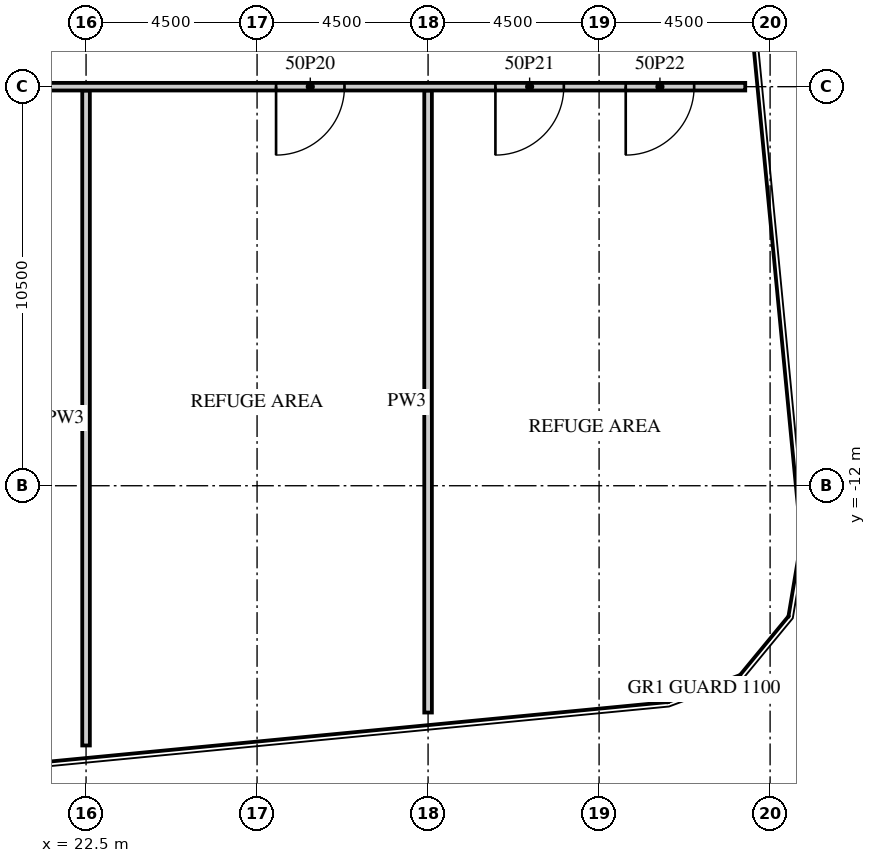
"""IFC4 building model, lengths in metres.
Left out: names, types, materials, properties, quantities, classifications, styles, units other than length and angle.
Written with IfcOpenShell. Run it as: python <this file> out.ifc"""

import sys

from ifc_helpers import new_model, si_unit, direction, frame, frame_2d, origin, place, context, subcontext, project, spatial, rectangle, extrude, element, fill, save


model = new_model("IFC4")
c1 = context("Model", 3, precision=1e-05, world=origin(), true_north=direction((0.0, 1.0)))
c2 = subcontext(c1, "Body", "Model", "MODEL_VIEW")
j1 = project(units=[si_unit("LENGTHUNIT", "METRE"), si_unit("PLANEANGLEUNIT", "RADIAN")], contexts=[c1])
p1 = place(None, origin())
s1 = spatial("IfcSite", under=j1, at=p1, CompositionType="ELEMENT")
p2 = place(p1, origin())
s2 = spatial("IfcBuilding", under=s1, at=p2, CompositionType="ELEMENT")
p3 = place(p2, frame((0.0, 0.0, 206.5)))
s3 = spatial("IfcBuildingStorey", under=s2, at=p3, CompositionType="ELEMENT", Elevation=206.5)
p4 = place(p3, frame((22.5, -18.834, 0.0), z_axis=(0.0, 0.0, 1.0), x_axis=(0.0, 1.0, 0.0)))
e1 = element("IfcWall", 1, at=p4, inside=s3, PredefinedType="PARTITIONING", context=c2, shape_type="SweptSolid", body=[
    extrude(rectangle(XDim=17.234, YDim=0.2, at=frame_2d((8.617, 0.0))), origin(), (0.0, 0.0, 1.0), 4.2),
])
p5 = place(p3, frame((31.5, -17.968, 0.0), z_axis=(0.0, 0.0, 1.0), x_axis=(0.0, 1.0, 0.0)))
e2 = element("IfcWall", 2, at=p5, inside=s3, PredefinedType="PARTITIONING", context=c2, shape_type="SweptSolid", body=[
    extrude(rectangle(XDim=16.367, YDim=0.2, at=frame_2d((8.184, 0.0))), origin(), (0.0, 0.0, 1.0), 4.2),
])
p6 = place(p3, frame((-13.3, -1.5, 0.0), z_axis=(0.0, 0.0, 1.0), x_axis=(1.0, 0.0, 0.0)))
e3 = element("IfcWall", 3, at=p6, inside=s3, PredefinedType="PARTITIONING", context=c2, shape_type="SweptSolid", body=[
    extrude(rectangle(XDim=53.146, YDim=0.2, at=frame_2d((26.573, 0.0))), origin(), (0.0, 0.0, 1.0), 4.2),
])
p7 = place(p6, frame((0.25, 0.0, 0.0)))
e4 = element("IfcOpeningElement", 4, at=p7, cuts=e3, PredefinedType="OPENING", context=c2, shape_type="SweptSolid", body=[
    extrude(rectangle(XDim=1.2, YDim=2.1, at=frame_2d((0.6, 1.05))), frame((0.0, 0.11, 0.0), z_axis=(0.0, -1.0, 0.0), x_axis=(1.0, 0.0, 0.0)), (0.0, 0.0, 1.0), 0.22),
])
p8 = place(p6, frame((13.64, 0.0, 0.0)))
e5 = element("IfcOpeningElement", 5, at=p8, cuts=e3, PredefinedType="OPENING", context=c2, shape_type="SweptSolid", body=[
    extrude(rectangle(XDim=1.8, YDim=2.1, at=frame_2d((0.9, 1.05))), frame((0.0, 0.11, 0.0), z_axis=(0.0, -1.0, 0.0), x_axis=(1.0, 0.0, 0.0)), (0.0, 0.0, 1.0), 0.22),
])
p9 = place(p6, frame((20.16, 0.0, 0.0)))
e6 = element("IfcOpeningElement", 6, at=p9, cuts=e3, PredefinedType="OPENING", context=c2, shape_type="SweptSolid", body=[
    extrude(rectangle(XDim=1.8, YDim=2.1, at=frame_2d((0.9, 1.05))), frame((0.0, 0.11, 0.0), z_axis=(0.0, -1.0, 0.0), x_axis=(1.0, 0.0, 0.0)), (0.0, 0.0, 1.0), 0.22),
])
p10 = place(p6, frame((31.8, 0.0, 0.0)))
e7 = element("IfcOpeningElement", 7, at=p10, cuts=e3, PredefinedType="OPENING", context=c2, shape_type="SweptSolid", body=[
    extrude(rectangle(XDim=1.0, YDim=2.1, at=frame_2d((0.5, 1.05))), frame((0.0, 0.11, 0.0), z_axis=(0.0, -1.0, 0.0), x_axis=(1.0, 0.0, 0.0)), (0.0, 0.0, 1.0), 0.22),
])
p11 = place(p6, frame((40.8, 0.0, 0.0)))
e8 = element("IfcOpeningElement", 8, at=p11, cuts=e3, PredefinedType="OPENING", context=c2, shape_type="SweptSolid", body=[
    extrude(rectangle(XDim=1.8, YDim=2.1, at=frame_2d((0.9, 1.05))), frame((0.0, 0.11, 0.0), z_axis=(0.0, -1.0, 0.0), x_axis=(1.0, 0.0, 0.0)), (0.0, 0.0, 1.0), 0.22),
])
p12 = place(p6, frame((46.572, 0.0, 0.0)))
e9 = element("IfcOpeningElement", 9, at=p12, cuts=e3, PredefinedType="OPENING", context=c2, shape_type="SweptSolid", body=[
    extrude(rectangle(XDim=1.8, YDim=2.1, at=frame_2d((0.9, 1.05))), frame((0.0, 0.11, 0.0), z_axis=(0.0, -1.0, 0.0), x_axis=(1.0, 0.0, 0.0)), (0.0, 0.0, 1.0), 0.22),
])
p13 = place(p6, frame((50.001, 0.0, 0.0)))
e10 = element("IfcOpeningElement", 10, at=p13, cuts=e3, PredefinedType="OPENING", context=c2, shape_type="SweptSolid", body=[
    extrude(rectangle(XDim=1.8, YDim=2.1, at=frame_2d((0.9, 1.05))), frame((0.0, 0.11, 0.0), z_axis=(0.0, -1.0, 0.0), x_axis=(1.0, 0.0, 0.0)), (0.0, 0.0, 1.0), 0.22),
])
p14 = place(p11, origin())
e11 = element("IfcDoor", 11, at=p14, inside=s3, OperationType="DOUBLE_DOOR_DOUBLE_SWING", PredefinedType="DOOR", context=c2, shape_type="SweptSolid", body=[
    extrude(rectangle(XDim=1.8, YDim=2.1, at=frame_2d((0.9, 1.05))), frame((0.0, 0.025, 0.0), z_axis=(0.0, -1.0, 0.0), x_axis=(1.0, 0.0, 0.0)), (0.0, 0.0, 1.0), 0.05),
])
fill(e8, e11)
p15 = place(p12, origin())
e12 = element("IfcDoor", 12, at=p15, inside=s3, OperationType="DOUBLE_DOOR_DOUBLE_SWING", PredefinedType="DOOR", context=c2, shape_type="SweptSolid", body=[
    extrude(rectangle(XDim=1.8, YDim=2.1, at=frame_2d((0.9, 1.05))), frame((0.0, 0.025, 0.0), z_axis=(0.0, -1.0, 0.0), x_axis=(1.0, 0.0, 0.0)), (0.0, 0.0, 1.0), 0.05),
])
fill(e9, e12)
p16 = place(p13, origin())
e13 = element("IfcDoor", 13, at=p16, inside=s3, OperationType="DOUBLE_DOOR_DOUBLE_SWING", PredefinedType="DOOR", context=c2, shape_type="SweptSolid", body=[
    extrude(rectangle(XDim=1.8, YDim=2.1, at=frame_2d((0.9, 1.05))), frame((0.0, 0.025, 0.0), z_axis=(0.0, -1.0, 0.0), x_axis=(1.0, 0.0, 0.0)), (0.0, 0.0, 1.0), 0.05),
])
fill(e10, e13)
save(model, sys.argv[1])
